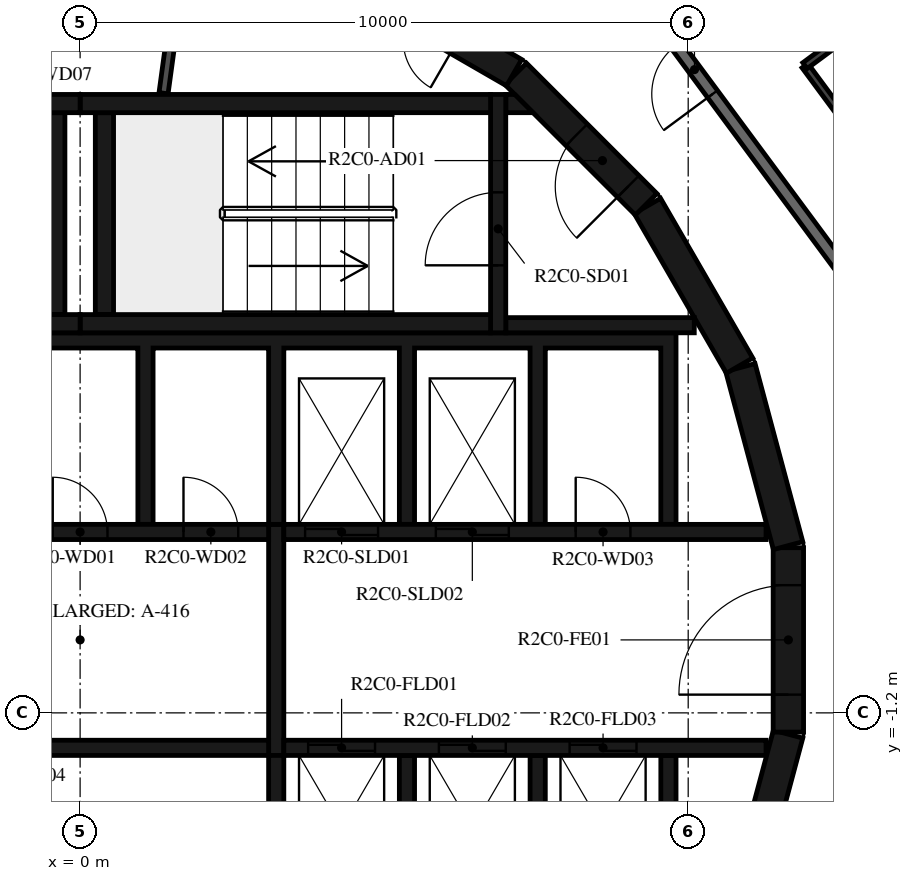
"""IFC4 building model, lengths in metres.
Left out: names, types, materials, properties, quantities, classifications, styles, units other than length and angle.
Written with IfcOpenShell. Run it as: python <this file> out.ifc"""

import sys

from ifc_helpers import new_model, si_unit, direction, frame, frame_2d, origin, place, context, subcontext, project, spatial, polyline, rectangle, outline, extrude, element, fill, save


model = new_model("IFC4")
c1 = context("Model", 3, precision=1e-05, world=origin(), true_north=direction((0.0, 1.0)))
c2 = subcontext(c1, "Body", "Model", "MODEL_VIEW")
j1 = project(units=[si_unit("LENGTHUNIT", "METRE"), si_unit("PLANEANGLEUNIT", "RADIAN")], contexts=[c1])
p1 = place(None, origin())
s1 = spatial("IfcSite", under=j1, at=p1, CompositionType="ELEMENT")
p2 = place(p1, origin())
s2 = spatial("IfcBuilding", under=s1, at=p2, CompositionType="ELEMENT")
p3 = place(p2, frame((0.0, 0.0, 104.7)))
s3 = spatial("IfcBuildingStorey", under=s2, at=p3, CompositionType="ELEMENT", Elevation=104.7)
p4 = place(p3, frame((10.858, -4.479, 0.0), z_axis=(0.0, 0.0, 1.0), x_axis=(0.258734743916, 0.965948410781, 0.0)))
e1 = element("IfcWall", 1, at=p4, inside=s3, PredefinedType="SHEAR", context=c2, shape_type="SweptSolid", body=[
    extrude(rectangle(XDim=3.033, YDim=0.5, at=frame_2d((1.516, 0.0))), origin(), (0.0, 0.0, 1.0), 3.05),
])
p5 = place(p3, frame((11.647, -1.516, 0.0), z_axis=(0.0, 0.0, 1.0), x_axis=(0.0, 1.0, 0.0)))
e2 = element("IfcWall", 2, at=p5, inside=s3, PredefinedType="SHEAR", context=c2, shape_type="SweptSolid", body=[
    extrude(rectangle(XDim=3.033, YDim=0.5, at=frame_2d((1.516, 0.0))), origin(), (0.0, 0.0, 1.0), 3.05),
])
p6 = place(p5, frame((0.616, 0.0, 0.0)))
e3 = element("IfcOpeningElement", 3, at=p6, cuts=e2, PredefinedType="OPENING", context=c2, shape_type="SweptSolid", body=[
    extrude(rectangle(XDim=1.8, YDim=2.1, at=frame_2d((0.9, 1.05))), frame((0.0, 0.26, 0.0), z_axis=(0.0, -1.0, 0.0), x_axis=(1.0, 0.0, 0.0)), (0.0, 0.0, 1.0), 0.52),
])
for number, where, z_axis, x_axis in (
    (4, (11.643, 1.55, 0.0), (0.0, 0.0, 1.0), (-0.259, 0.966, 0.0)),
    (5, (10.845, 4.51, 0.0), (0.0, 0.0, 1.0), (-0.5, 0.866, 0.0)),
):
    element("IfcWall", number, at=place(p3, frame(where, z_axis=z_axis, x_axis=x_axis)), inside=s3, PredefinedType="SHEAR", context=c2, shape_type="SweptSolid", body=[
        extrude(rectangle(XDim=3.033, YDim=0.5, at=frame_2d((1.516, 0.0))), origin(), (0.0, 0.0, 1.0), 3.05),
    ])
p7 = place(p3, frame((9.308, 7.164, 0.0), z_axis=(0.0, 0.0, 1.0), x_axis=(-0.707106781187, 0.707106781187, 0.0)))
e6 = element("IfcWall", 6, at=p7, inside=s3, PredefinedType="SHEAR", context=c2, shape_type="SweptSolid", body=[
    extrude(rectangle(XDim=3.032, YDim=0.5, at=frame_2d((1.516, 0.0))), origin(), (0.0, 0.0, 1.0), 3.05),
])
p8 = place(p7, frame((0.416, 0.0, 0.0)))
e7 = element("IfcOpeningElement", 7, at=p8, cuts=e6, PredefinedType="OPENING", context=c2, shape_type="SweptSolid", body=[
    extrude(rectangle(XDim=1.2, YDim=2.1, at=frame_2d((0.6, 1.05))), frame((0.0, 0.26, 0.0), z_axis=(0.0, -1.0, 0.0), x_axis=(1.0, 0.0, 0.0)), (0.0, 0.0, 1.0), 0.52),
])
p9 = place(p3, frame((7.137, 9.329, 0.0), z_axis=(0.0, 0.0, 1.0), x_axis=(-0.865975092491, 0.500087131594, 0.0)))
e8 = element("IfcWall", 8, at=p9, inside=s3, PredefinedType="SHEAR", context=c2, shape_type="SweptSolid", body=[
    extrude(rectangle(XDim=3.033, YDim=0.5, at=frame_2d((1.516, 0.0))), origin(), (0.0, 0.0, 1.0), 3.05),
])
p10 = place(p9, frame((1.066, 0.0, 0.0)))
e9 = element("IfcOpeningElement", 9, at=p10, cuts=e8, PredefinedType="OPENING", context=c2, shape_type="SweptSolid", body=[
    extrude(rectangle(XDim=0.9, YDim=2.1, at=frame_2d((0.45, 1.05))), frame((0.0, 0.26, 0.0), z_axis=(0.0, -1.0, 0.0), x_axis=(1.0, 0.0, 0.0)), (0.0, 0.0, 1.0), 0.52),
])
for number, where, z_axis, x_axis in (
    (10, (0.0, 5.2, 0.0), (0.0, 0.0, 1.0), (1.0, 0.0, 0.0)),
    (11, (0.0, 8.82, 0.0), (0.0, 0.0, 1.0), (1.0, 0.0, 0.0)),
):
    element("IfcWall", number, at=place(p3, frame(where, z_axis=z_axis, x_axis=x_axis)), inside=s3, PredefinedType="SHEAR", context=c2, shape_type="SweptSolid", body=[
        extrude(rectangle(XDim=6.75, YDim=0.3, at=frame_2d((3.375, 0.0))), origin(), (0.0, 0.0, 1.0), 3.05),
    ])
p11 = place(p3, frame((0.4, 5.35, 0.0), z_axis=(0.0, 0.0, 1.0), x_axis=(0.0, 1.0, 0.0)))
e12 = element("IfcWall", 12, at=p11, inside=s3, PredefinedType="SHEAR", context=c2, shape_type="SweptSolid", body=[
    extrude(rectangle(XDim=3.32, YDim=0.3, at=frame_2d((1.66, 0.0))), origin(), (0.0, 0.0, 1.0), 3.05),
])
p12 = place(p3, frame((6.875, 5.05, 0.0), z_axis=(0.0, 0.0, 1.0), x_axis=(0.0, 1.0, 0.0)))
e13 = element("IfcWall", 13, at=p12, inside=s3, PredefinedType="SHEAR", context=c2, shape_type="SweptSolid", body=[
    extrude(rectangle(XDim=3.92, YDim=0.25, at=frame_2d((1.96, 0.0))), origin(), (0.0, 0.0, 1.0), 3.05),
])
p13 = place(p12, frame((1.11, 0.0, 0.0)))
e14 = element("IfcOpeningElement", 14, at=p13, cuts=e13, PredefinedType="OPENING", context=c2, shape_type="SweptSolid", body=[
    extrude(rectangle(XDim=1.2, YDim=2.1, at=frame_2d((0.6, 1.05))), frame((0.0, 0.135, 0.0), z_axis=(0.0, -1.0, 0.0), x_axis=(1.0, 0.0, 0.0)), (0.0, 0.0, 1.0), 0.27),
])
p14 = place(p3, frame((7.0, 5.175, 0.0), z_axis=(0.0, 0.0, 1.0), x_axis=(1.0, 0.0, 0.0)))
e15 = element("IfcWall", 15, at=p14, inside=s3, PredefinedType="SHEAR", context=c2, shape_type="SweptSolid", body=[
    extrude(rectangle(XDim=3.1, YDim=0.25, at=frame_2d((1.55, 0.0))), origin(), (0.0, 0.0, 1.0), 3.05),
])
p15 = place(p3, origin())
e16 = element("IfcWall", 16, at=p15, inside=s3, PredefinedType="SHEAR", context=c2, shape_type="SweptSolid", body=[
    extrude(outline(polyline([(7.448, 8.67), (7.0, 8.67), (7.0, 8.97), (7.148, 8.97), (7.448, 8.67)])), origin(), (0.0, 0.0, 1.0), 3.05),
])
for number, where, z_axis, x_axis in (
    (17, (-6.75, 5.2, 0.0), (0.0, 0.0, 1.0), (1.0, 0.0, 0.0)),
    (18, (-6.75, 8.82, 0.0), (0.0, 0.0, 1.0), (1.0, 0.0, 0.0)),
):
    element("IfcWall", number, at=place(p3, frame(where, z_axis=z_axis, x_axis=x_axis)), inside=s3, PredefinedType="SHEAR", context=c2, shape_type="SweptSolid", body=[
        extrude(rectangle(XDim=6.75, YDim=0.3, at=frame_2d((3.375, 0.0))), origin(), (0.0, 0.0, 1.0), 3.05),
    ])
p16 = place(p3, frame((-0.4, 5.35, 0.0), z_axis=(0.0, 0.0, 1.0), x_axis=(0.0, 1.0, 0.0)))
e19 = element("IfcWall", 19, at=p16, inside=s3, PredefinedType="SHEAR", context=c2, shape_type="SweptSolid", body=[
    extrude(rectangle(XDim=3.32, YDim=0.3, at=frame_2d((1.66, 0.0))), origin(), (0.0, 0.0, 1.0), 3.05),
])
p17 = place(p3, origin())
e20 = element("IfcWall", 20, at=p17, inside=s3, PredefinedType="SHEAR", context=c2, shape_type="SweptSolid", body=[
    extrude(outline(polyline([(-9.55, 4.8), (-7.65, 4.8), (-7.65, 1.9), (-7.4, 1.9), (-7.4, 4.8), (-5.5, 4.8), (-5.5, 1.9), (-5.25, 1.9), (-5.25, 4.8), (-3.35, 4.8), (-3.35, 1.9), (-3.1, 1.9), (-3.1, 4.8), (-1.2, 4.8), (-1.2, 1.9), (-0.95, 1.9), (-0.95, 4.8), (0.95, 4.8), (0.95, 1.9), (1.2, 1.9), (1.2, 4.8), (3.1, 4.8), (3.1, 1.9), (3.35, 1.9), (3.35, 4.8), (5.25, 4.8), (5.25, 1.9), (5.5, 1.9), (5.5, 4.8), (7.4, 4.8), (7.4, 1.9), (7.65, 1.9), (7.65, 4.8), (9.55, 4.8), (9.55, 1.9), (9.8, 1.9), (9.8, 4.8), (9.8, 5.05), (-9.8, 5.05), (-9.8, 4.8), (-9.8, 1.9), (-9.55, 1.9), (-9.55, 4.8)])), origin(), (0.0, 0.0, 1.0), 3.05),
])
p18 = place(p3, origin())
e21 = element("IfcWall", 21, at=p18, inside=s3, PredefinedType="SHEAR", context=c2, shape_type="SweptSolid", body=[
    extrude(outline(polyline([(9.8, -5.05), (9.8, -4.8), (9.8, -1.9), (9.55, -1.9), (9.55, -4.8), (7.65, -4.8), (7.65, -1.9), (7.4, -1.9), (7.4, -4.8), (5.5, -4.8), (5.5, -1.9), (5.25, -1.9), (5.25, -4.8), (3.35, -4.8), (3.35, -1.9), (3.1, -1.9), (3.1, -4.8), (-5.25, -4.8), (-5.25, -1.9), (-5.5, -1.9), (-5.5, -4.8), (-7.4, -4.8), (-7.4, -1.9), (-7.65, -1.9), (-7.65, -4.8), (-9.55, -4.8), (-9.55, -1.9), (-9.8, -1.9), (-9.8, -4.8), (-9.8, -5.05), (9.8, -5.05)])), origin(), (0.0, 0.0, 1.0), 3.05),
])
p19 = place(p3, frame((-11.28, 1.775, 0.0), z_axis=(0.0, 0.0, 1.0), x_axis=(1.0, 0.0, 0.0)))
e22 = element("IfcWall", 22, at=p19, inside=s3, PredefinedType="SHEAR", context=c2, shape_type="SweptSolid", body=[
    extrude(rectangle(XDim=14.38, YDim=0.25, at=frame_2d((7.19, 0.0))), origin(), (0.0, 0.0, 1.0), 3.05),
])
p20 = place(p19, frame((2.13, 0.0, 0.0)))
e23 = element("IfcOpeningElement", 23, at=p20, cuts=e22, PredefinedType="OPENING", context=c2, shape_type="SweptSolid", body=[
    extrude(rectangle(XDim=1.1, YDim=2.1, at=frame_2d((0.55, 1.05))), frame((0.0, 0.135, 0.0), z_axis=(0.0, -1.0, 0.0), x_axis=(1.0, 0.0, 0.0)), (0.0, 0.0, 1.0), 0.27),
])
p21 = place(p19, frame((4.28, 0.0, 0.0)))
e24 = element("IfcOpeningElement", 24, at=p21, cuts=e22, PredefinedType="OPENING", context=c2, shape_type="SweptSolid", body=[
    extrude(rectangle(XDim=1.1, YDim=2.1, at=frame_2d((0.55, 1.05))), frame((0.0, 0.135, 0.0), z_axis=(0.0, -1.0, 0.0), x_axis=(1.0, 0.0, 0.0)), (0.0, 0.0, 1.0), 0.27),
])
p22 = place(p19, frame((6.43, 0.0, 0.0)))
e25 = element("IfcOpeningElement", 25, at=p22, cuts=e22, PredefinedType="OPENING", context=c2, shape_type="SweptSolid", body=[
    extrude(rectangle(XDim=1.1, YDim=2.1, at=frame_2d((0.55, 1.05))), frame((0.0, 0.135, 0.0), z_axis=(0.0, -1.0, 0.0), x_axis=(1.0, 0.0, 0.0)), (0.0, 0.0, 1.0), 0.27),
])
p23 = place(p19, frame((8.58, 0.0, 0.0)))
e26 = element("IfcOpeningElement", 26, at=p23, cuts=e22, PredefinedType="OPENING", context=c2, shape_type="SweptSolid", body=[
    extrude(rectangle(XDim=1.1, YDim=2.1, at=frame_2d((0.55, 1.05))), frame((0.0, 0.135, 0.0), z_axis=(0.0, -1.0, 0.0), x_axis=(1.0, 0.0, 0.0)), (0.0, 0.0, 1.0), 0.27),
])
p24 = place(p19, frame((10.83, 0.0, 0.0)))
e27 = element("IfcOpeningElement", 27, at=p24, cuts=e22, PredefinedType="OPENING", context=c2, shape_type="SweptSolid", body=[
    extrude(rectangle(XDim=0.9, YDim=2.1, at=frame_2d((0.45, 1.05))), frame((0.0, 0.135, 0.0), z_axis=(0.0, -1.0, 0.0), x_axis=(1.0, 0.0, 0.0)), (0.0, 0.0, 1.0), 0.27),
])
p25 = place(p19, frame((12.98, 0.0, 0.0)))
e28 = element("IfcOpeningElement", 28, at=p25, cuts=e22, PredefinedType="OPENING", context=c2, shape_type="SweptSolid", body=[
    extrude(rectangle(XDim=0.9, YDim=2.1, at=frame_2d((0.45, 1.05))), frame((0.0, 0.135, 0.0), z_axis=(0.0, -1.0, 0.0), x_axis=(1.0, 0.0, 0.0)), (0.0, 0.0, 1.0), 0.27),
])
p26 = place(p3, frame((3.35, 1.775, 0.0), z_axis=(0.0, 0.0, 1.0), x_axis=(1.0, 0.0, 0.0)))
e29 = element("IfcWall", 29, at=p26, inside=s3, PredefinedType="SHEAR", context=c2, shape_type="SweptSolid", body=[
    extrude(rectangle(XDim=7.93, YDim=0.25, at=frame_2d((3.965, 0.0))), origin(), (0.0, 0.0, 1.0), 3.05),
])
p27 = place(p26, frame((0.35, 0.0, 0.0)))
e30 = element("IfcOpeningElement", 30, at=p27, cuts=e29, PredefinedType="OPENING", context=c2, shape_type="SweptSolid", body=[
    extrude(rectangle(XDim=1.2, YDim=2.4, at=frame_2d((0.6, 1.2))), frame((0.0, 0.135, 0.0), z_axis=(0.0, -1.0, 0.0), x_axis=(1.0, 0.0, 0.0)), (0.0, 0.0, 1.0), 0.27),
])
p28 = place(p26, frame((2.5, 0.0, 0.0)))
e31 = element("IfcOpeningElement", 31, at=p28, cuts=e29, PredefinedType="OPENING", context=c2, shape_type="SweptSolid", body=[
    extrude(rectangle(XDim=1.2, YDim=2.4, at=frame_2d((0.6, 1.2))), frame((0.0, 0.135, 0.0), z_axis=(0.0, -1.0, 0.0), x_axis=(1.0, 0.0, 0.0)), (0.0, 0.0, 1.0), 0.27),
])
p29 = place(p26, frame((4.8, 0.0, 0.0)))
e32 = element("IfcOpeningElement", 32, at=p29, cuts=e29, PredefinedType="OPENING", context=c2, shape_type="SweptSolid", body=[
    extrude(rectangle(XDim=0.9, YDim=2.1, at=frame_2d((0.45, 1.05))), frame((0.0, 0.135, 0.0), z_axis=(0.0, -1.0, 0.0), x_axis=(1.0, 0.0, 0.0)), (0.0, 0.0, 1.0), 0.27),
])
p30 = place(p3, frame((-11.28, -1.775, 0.0), z_axis=(0.0, 0.0, 1.0), x_axis=(1.0, 0.0, 0.0)))
e33 = element("IfcWall", 33, at=p30, inside=s3, PredefinedType="SHEAR", context=c2, shape_type="SweptSolid", body=[
    extrude(rectangle(XDim=14.38, YDim=0.25, at=frame_2d((7.19, 0.0))), origin(), (0.0, 0.0, 1.0), 3.05),
])
p31 = place(p30, frame((9.755, 0.0, 0.0)))
e34 = element("IfcOpeningElement", 34, at=p31, cuts=e33, PredefinedType="OPENING", context=c2, shape_type="SweptSolid", body=[
    extrude(rectangle(XDim=0.9, YDim=2.1, at=frame_2d((0.45, 1.05))), frame((0.0, 0.135, 0.0), z_axis=(0.0, -1.0, 0.0), x_axis=(1.0, 0.0, 0.0)), (0.0, 0.0, 1.0), 0.27),
])
p32 = place(p3, frame((3.35, -1.775, 0.0), z_axis=(0.0, 0.0, 1.0), x_axis=(1.0, 0.0, 0.0)))
e35 = element("IfcWall", 35, at=p32, inside=s3, PredefinedType="SHEAR", context=c2, shape_type="SweptSolid", body=[
    extrude(rectangle(XDim=7.93, YDim=0.25, at=frame_2d((3.965, 0.0))), origin(), (0.0, 0.0, 1.0), 3.05),
])
p33 = place(p32, frame((0.4, 0.0, 0.0)))
e36 = element("IfcOpeningElement", 36, at=p33, cuts=e35, PredefinedType="OPENING", context=c2, shape_type="SweptSolid", body=[
    extrude(rectangle(XDim=1.1, YDim=2.4, at=frame_2d((0.55, 1.2))), frame((0.0, 0.135, 0.0), z_axis=(0.0, -1.0, 0.0), x_axis=(1.0, 0.0, 0.0)), (0.0, 0.0, 1.0), 0.27),
])
p34 = place(p32, frame((2.55, 0.0, 0.0)))
e37 = element("IfcOpeningElement", 37, at=p34, cuts=e35, PredefinedType="OPENING", context=c2, shape_type="SweptSolid", body=[
    extrude(rectangle(XDim=1.1, YDim=2.4, at=frame_2d((0.55, 1.2))), frame((0.0, 0.135, 0.0), z_axis=(0.0, -1.0, 0.0), x_axis=(1.0, 0.0, 0.0)), (0.0, 0.0, 1.0), 0.27),
])
p35 = place(p32, frame((4.7, 0.0, 0.0)))
e38 = element("IfcOpeningElement", 38, at=p35, cuts=e35, PredefinedType="OPENING", context=c2, shape_type="SweptSolid", body=[
    extrude(rectangle(XDim=1.1, YDim=2.4, at=frame_2d((0.55, 1.2))), frame((0.0, 0.135, 0.0), z_axis=(0.0, -1.0, 0.0), x_axis=(1.0, 0.0, 0.0)), (0.0, 0.0, 1.0), 0.27),
])
p36 = place(p3, frame((3.225, -1.9, 0.0), z_axis=(0.0, 0.0, 1.0), x_axis=(0.0, 1.0, 0.0)))
e39 = element("IfcWall", 39, at=p36, inside=s3, PredefinedType="SHEAR", context=c2, shape_type="SweptSolid", body=[
    extrude(rectangle(XDim=3.8, YDim=0.25, at=frame_2d((1.9, 0.0))), origin(), (0.0, 0.0, 1.0), 3.05),
])
p37 = place(p3, frame((1.691, 11.326, 0.0), z_axis=(0.0, 0.0, 1.0), x_axis=(-0.135344253201, -0.990798633994, 0.0)))
e40 = element("IfcWall", 40, at=p37, inside=s3, PredefinedType="PARTITIONING", context=c2, shape_type="SweptSolid", body=[
    extrude(rectangle(XDim=2.358, YDim=0.15, at=frame_2d((1.179, 0.0))), origin(), (0.0, 0.0, 1.0), 3.05),
])
p38 = place(p37, frame((0.729, 0.0, 0.0)))
e41 = element("IfcOpeningElement", 41, at=p38, cuts=e40, PredefinedType="OPENING", context=c2, shape_type="SweptSolid", body=[
    extrude(rectangle(XDim=0.9, YDim=2.1, at=frame_2d((0.45, 1.05))), frame((0.0, 0.085, 0.0), z_axis=(0.0, -1.0, 0.0), x_axis=(1.0, 0.0, 0.0)), (0.0, 0.0, 1.0), 0.17),
])
p39 = place(p3, frame((11.1, -8.829, 0.0), z_axis=(0.0, 0.0, 1.0), x_axis=(0.398741918631, 0.917063183388, 0.0)))
e42 = element("IfcWall", 42, at=p39, inside=s3, PredefinedType="STANDARD", context=c2, shape_type="SweptSolid", body=[
    extrude(rectangle(XDim=7.342, YDim=0.2, at=frame_2d((3.671, 0.0))), origin(), (0.0, 0.0, 1.0), 3.05),
])
p40 = place(p3, frame((13.196, 5.198, 0.0), z_axis=(0.0, 0.0, 1.0), x_axis=(-0.594805187394, 0.803869883159, 0.0)))
e43 = element("IfcWall", 43, at=p40, inside=s3, PredefinedType="STANDARD", context=c2, shape_type="SweptSolid", body=[
    extrude(rectangle(XDim=7.342, YDim=0.2, at=frame_2d((3.671, 0.0))), origin(), (0.0, 0.0, 1.0), 3.05),
])
p41 = place(p40, frame((4.7, 0.0, 0.0)))
e44 = element("IfcOpeningElement", 44, at=p41, cuts=e43, PredefinedType="OPENING", context=c2, shape_type="SweptSolid", body=[
    extrude(rectangle(XDim=1.0, YDim=2.1, at=frame_2d((0.5, 1.05))), frame((0.0, 0.11, 0.0), z_axis=(0.0, -1.0, 0.0), x_axis=(1.0, 0.0, 0.0)), (0.0, 0.0, 1.0), 0.22),
])
p42 = place(p3, frame((14.641, 5.767, 0.0), z_axis=(0.0, 0.0, 1.0), x_axis=(-0.594785744505, 0.803884269117, 0.0)))
e45 = element("IfcWall", 45, at=p42, inside=s3, PredefinedType="PARTITIONING", context=c2, shape_type="SweptSolid", body=[
    extrude(rectangle(XDim=4.573, YDim=0.12, at=frame_2d((2.287, 0.0))), origin(), (0.0, 0.0, 1.0), 3.05),
])
p43 = place(p42, frame((0.513, 0.0, 0.0)))
e46 = element("IfcOpeningElement", 46, at=p43, cuts=e45, PredefinedType="OPENING", context=c2, shape_type="SweptSolid", body=[
    extrude(rectangle(XDim=0.9, YDim=2.1, at=frame_2d((0.45, 1.05))), frame((0.0, 0.07, 0.0), z_axis=(0.0, -1.0, 0.0), x_axis=(1.0, 0.0, 0.0)), (0.0, 0.0, 1.0), 0.14),
])
p44 = place(p3, frame((11.921, 9.444, 0.0), z_axis=(0.0, 0.0, 1.0), x_axis=(0.803768532163, 0.594942137274, 0.0)))
e47 = element("IfcWall", 47, at=p44, inside=s3, PredefinedType="PARTITIONING", context=c2, shape_type="SweptSolid", body=[
    extrude(rectangle(XDim=1.146, YDim=0.12, at=frame_2d((0.573, 0.0))), origin(), (0.0, 0.0, 1.0), 3.05),
])
p45 = place(p13, origin())
e48 = element("IfcDoor", 48, at=p45, inside=s3, OperationType="SINGLE_SWING_LEFT", PredefinedType="DOOR", context=c2, shape_type="SweptSolid", body=[
    extrude(rectangle(XDim=1.2, YDim=2.1, at=frame_2d((0.6, 1.05))), frame((0.0, 0.025, 0.0), z_axis=(0.0, -1.0, 0.0), x_axis=(1.0, 0.0, 0.0)), (0.0, 0.0, 1.0), 0.05),
])
fill(e14, e48)
p46 = place(p8, origin())
e49 = element("IfcDoor", 49, at=p46, inside=s3, OperationType="SINGLE_SWING_RIGHT", PredefinedType="DOOR", context=c2, shape_type="SweptSolid", body=[
    extrude(rectangle(XDim=1.2, YDim=2.1, at=frame_2d((0.6, 1.05))), frame((0.0, 0.025, 0.0), z_axis=(0.0, -1.0, 0.0), x_axis=(1.0, 0.0, 0.0)), (0.0, 0.0, 1.0), 0.05),
])
fill(e7, e49)
p47 = place(p6, origin())
e50 = element("IfcDoor", 50, at=p47, inside=s3, OperationType="DOUBLE_DOOR_SINGLE_SWING", PredefinedType="DOOR", context=c2, shape_type="SweptSolid", body=[
    extrude(rectangle(XDim=1.8, YDim=2.1, at=frame_2d((0.9, 1.05))), frame((0.0, 0.025, 0.0), z_axis=(0.0, -1.0, 0.0), x_axis=(1.0, 0.0, 0.0)), (0.0, 0.0, 1.0), 0.05),
])
fill(e3, e50)
p48 = place(p27, origin())
e51 = element("IfcDoor", 51, at=p48, inside=s3, OperationType="DOUBLE_DOOR_SLIDING", PredefinedType="DOOR", context=c2, shape_type="SweptSolid", body=[
    extrude(rectangle(XDim=1.2, YDim=2.4, at=frame_2d((0.6, 1.2))), frame((0.0, 0.025, 0.0), z_axis=(0.0, -1.0, 0.0), x_axis=(1.0, 0.0, 0.0)), (0.0, 0.0, 1.0), 0.05),
])
fill(e30, e51)
p49 = place(p28, origin())
e52 = element("IfcDoor", 52, at=p49, inside=s3, OperationType="DOUBLE_DOOR_SLIDING", PredefinedType="DOOR", context=c2, shape_type="SweptSolid", body=[
    extrude(rectangle(XDim=1.2, YDim=2.4, at=frame_2d((0.6, 1.2))), frame((0.0, 0.025, 0.0), z_axis=(0.0, -1.0, 0.0), x_axis=(1.0, 0.0, 0.0)), (0.0, 0.0, 1.0), 0.05),
])
fill(e31, e52)
p50 = place(p33, origin())
e53 = element("IfcDoor", 53, at=p50, inside=s3, OperationType="DOUBLE_DOOR_SLIDING", PredefinedType="DOOR", context=c2, shape_type="SweptSolid", body=[
    extrude(rectangle(XDim=1.1, YDim=2.4, at=frame_2d((0.55, 1.2))), frame((0.0, 0.025, 0.0), z_axis=(0.0, -1.0, 0.0), x_axis=(1.0, 0.0, 0.0)), (0.0, 0.0, 1.0), 0.05),
])
fill(e36, e53)
p51 = place(p34, origin())
e54 = element("IfcDoor", 54, at=p51, inside=s3, OperationType="DOUBLE_DOOR_SLIDING", PredefinedType="DOOR", context=c2, shape_type="SweptSolid", body=[
    extrude(rectangle(XDim=1.1, YDim=2.4, at=frame_2d((0.55, 1.2))), frame((0.0, 0.025, 0.0), z_axis=(0.0, -1.0, 0.0), x_axis=(1.0, 0.0, 0.0)), (0.0, 0.0, 1.0), 0.05),
])
fill(e37, e54)
p52 = place(p35, origin())
e55 = element("IfcDoor", 55, at=p52, inside=s3, OperationType="DOUBLE_DOOR_SLIDING", PredefinedType="DOOR", context=c2, shape_type="SweptSolid", body=[
    extrude(rectangle(XDim=1.1, YDim=2.4, at=frame_2d((0.55, 1.2))), frame((0.0, 0.025, 0.0), z_axis=(0.0, -1.0, 0.0), x_axis=(1.0, 0.0, 0.0)), (0.0, 0.0, 1.0), 0.05),
])
fill(e38, e55)
p53 = place(p24, origin())
e56 = element("IfcDoor", 56, at=p53, inside=s3, OperationType="SINGLE_SWING_RIGHT", PredefinedType="DOOR", context=c2, shape_type="SweptSolid", body=[
    extrude(rectangle(XDim=0.9, YDim=2.1, at=frame_2d((0.45, 1.05))), frame((0.0, 0.025, 0.0), z_axis=(0.0, -1.0, 0.0), x_axis=(1.0, 0.0, 0.0)), (0.0, 0.0, 1.0), 0.05),
])
fill(e27, e56)
p54 = place(p25, origin())
e57 = element("IfcDoor", 57, at=p54, inside=s3, OperationType="SINGLE_SWING_LEFT", PredefinedType="DOOR", context=c2, shape_type="SweptSolid", body=[
    extrude(rectangle(XDim=0.9, YDim=2.1, at=frame_2d((0.45, 1.05))), frame((0.0, 0.025, 0.0), z_axis=(0.0, -1.0, 0.0), x_axis=(1.0, 0.0, 0.0)), (0.0, 0.0, 1.0), 0.05),
])
fill(e28, e57)
p55 = place(p29, origin())
e58 = element("IfcDoor", 58, at=p55, inside=s3, OperationType="SINGLE_SWING_RIGHT", PredefinedType="DOOR", context=c2, shape_type="SweptSolid", body=[
    extrude(rectangle(XDim=0.9, YDim=2.1, at=frame_2d((0.45, 1.05))), frame((0.0, 0.025, 0.0), z_axis=(0.0, -1.0, 0.0), x_axis=(1.0, 0.0, 0.0)), (0.0, 0.0, 1.0), 0.05),
])
fill(e32, e58)
p56 = place(p41, origin())
e59 = element("IfcDoor", 59, at=p56, inside=s3, OperationType="SINGLE_SWING_RIGHT", PredefinedType="DOOR", context=c2, shape_type="SweptSolid", body=[
    extrude(rectangle(XDim=1.0, YDim=2.1, at=frame_2d((0.5, 1.05))), frame((0.0, 0.025, 0.0), z_axis=(0.0, -1.0, 0.0), x_axis=(1.0, 0.0, 0.0)), (0.0, 0.0, 1.0), 0.05),
])
fill(e44, e59)
save(model, sys.argv[1])
